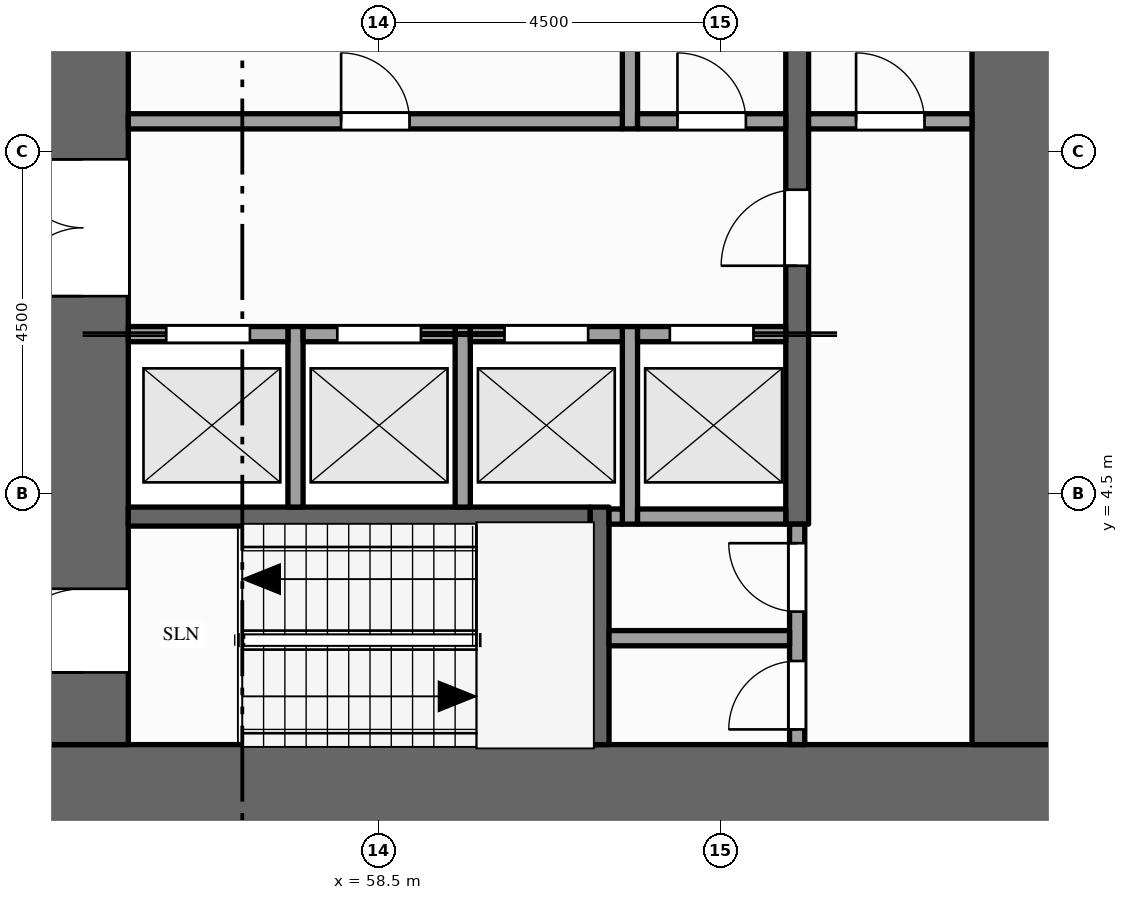
"""IFC4 building model, lengths in metres.
Left out: names, types, materials, properties, quantities, classifications, styles, units other than length and angle.
Written with IfcOpenShell. Run it as: python <this file> out.ifc"""

import sys

from ifc_helpers import new_model, si_unit, direction, frame, frame_2d, origin, place, context, subcontext, project, spatial, rectangle, extrude, element, fill, save


model = new_model("IFC4")
c1 = context("Model", 3, precision=1e-05, world=origin(), true_north=direction((0.0, 1.0)))
c2 = subcontext(c1, "Body", "Model", "MODEL_VIEW")
j1 = project(units=[si_unit("LENGTHUNIT", "METRE"), si_unit("PLANEANGLEUNIT", "RADIAN")], contexts=[c1])
p1 = place(None, origin())
s1 = spatial("IfcSite", under=j1, at=p1, CompositionType="ELEMENT")
p2 = place(p1, origin())
s2 = spatial("IfcBuilding", under=s1, at=p2, CompositionType="ELEMENT")
p3 = place(p2, frame((0.0, 0.0, 119.0)))
s3 = spatial("IfcBuildingStorey", under=s2, at=p3, CompositionType="ELEMENT", Elevation=119.0)
p4 = place(p3, frame((67.5, 0.6, -0.15), z_axis=(0.0, 0.0, 1.0), x_axis=(-1.0, 0.0, 0.0)))
e1 = element("IfcWall", 1, at=p4, inside=s3, PredefinedType="SHEAR", context=c2, shape_type="SweptSolid", body=[
    extrude(rectangle(XDim=13.5, YDim=1.2, at=frame_2d((6.75, 0.0))), origin(), (0.0, 0.0, 1.0), 4.0),
])
p5 = place(p3, frame((54.6, 1.2, -0.15), z_axis=(0.0, 0.0, 1.0), x_axis=(0.0, 1.0, 0.0)))
e2 = element("IfcWall", 2, at=p5, inside=s3, PredefinedType="SHEAR", context=c2, shape_type="SweptSolid", body=[
    extrude(rectangle(XDim=20.1, YDim=1.2, at=frame_2d((10.05, 0.0))), origin(), (0.0, 0.0, 1.0), 4.0),
])
p6 = place(p5, frame((5.9, 0.0, 0.15)))
e3 = element("IfcOpeningElement", 3, at=p6, cuts=e2, PredefinedType="OPENING", context=c2, shape_type="SweptSolid", body=[
    extrude(rectangle(XDim=1.8, YDim=2.1, at=frame_2d((0.9, 1.05))), frame((0.0, 0.61, 0.0), z_axis=(0.0, -1.0, 0.0), x_axis=(1.0, 0.0, 0.0)), (0.0, 0.0, 1.0), 1.22),
])
p7 = place(p5, frame((11.95, 0.0, 0.15)))
e4 = element("IfcOpeningElement", 4, at=p7, cuts=e2, PredefinedType="OPENING", context=c2, shape_type="SweptSolid", body=[
    extrude(rectangle(XDim=1.1, YDim=2.1, at=frame_2d((0.55, 1.05))), frame((0.0, 0.61, 0.0), z_axis=(0.0, -1.0, 0.0), x_axis=(1.0, 0.0, 0.0)), (0.0, 0.0, 1.0), 1.22),
])
p8 = place(p5, frame((0.95, 0.0, 0.15)))
e5 = element("IfcOpeningElement", 5, at=p8, cuts=e2, PredefinedType="OPENING", context=c2, shape_type="SweptSolid", body=[
    extrude(rectangle(XDim=1.1, YDim=2.1, at=frame_2d((0.55, 1.05))), frame((0.0, 0.61, 0.0), z_axis=(0.0, -1.0, 0.0), x_axis=(1.0, 0.0, 0.0)), (0.0, 0.0, 1.0), 1.22),
])
p9 = place(p5, frame((18.15, 0.0, 0.15)))
e6 = element("IfcOpeningElement", 6, at=p9, cuts=e2, PredefinedType="OPENING", context=c2, shape_type="SweptSolid", body=[
    extrude(rectangle(XDim=1.1, YDim=2.1, at=frame_2d((0.55, 1.05))), frame((0.0, 0.61, 0.0), z_axis=(0.0, -1.0, 0.0), x_axis=(1.0, 0.0, 0.0)), (0.0, 0.0, 1.0), 1.22),
])
p10 = place(p3, frame((66.9, 1.2, -0.15), z_axis=(0.0, 0.0, 1.0), x_axis=(0.0, 1.0, 0.0)))
e7 = element("IfcWall", 7, at=p10, inside=s3, PredefinedType="SHEAR", context=c2, shape_type="SweptSolid", body=[
    extrude(rectangle(XDim=20.1, YDim=1.2, at=frame_2d((10.05, 0.0))), origin(), (0.0, 0.0, 1.0), 4.0),
])
for number, where, z_axis, x_axis in (
    (8, (57.4, 4.325, 0.0), (0.0, 0.0, 1.0), (0.0, 1.0, 0.0)),
    (9, (59.6, 4.325, 0.0), (0.0, 0.0, 1.0), (0.0, 1.0, 0.0)),
):
    element("IfcWall", number, at=place(p3, frame(where, z_axis=z_axis, x_axis=x_axis)), inside=s3, PredefinedType="SOLIDWALL", context=c2, shape_type="SweptSolid", body=[
        extrude(rectangle(XDim=2.375, YDim=0.2, at=frame_2d((1.188, 0.0))), origin(), (0.0, 0.0, 1.0), 3.85),
    ])
p11 = place(p3, frame((61.4, 1.2, 0.0), z_axis=(0.0, 0.0, 1.0), x_axis=(0.0, 1.0, 0.0)))
e10 = element("IfcWall", 10, at=p11, inside=s3, PredefinedType="SHEAR", context=c2, shape_type="SweptSolid", body=[
    extrude(rectangle(XDim=3.125, YDim=0.25, at=frame_2d((1.562, 0.0))), origin(), (0.0, 0.0, 1.0), 3.85),
])
p12 = place(p3, frame((61.8, 4.1, 0.0), z_axis=(0.0, 0.0, 1.0), x_axis=(0.0, 1.0, 0.0)))
e11 = element("IfcWall", 11, at=p12, inside=s3, PredefinedType="SOLIDWALL", context=c2, shape_type="SweptSolid", body=[
    extrude(rectangle(XDim=2.6, YDim=0.2, at=frame_2d((1.3, 0.0))), origin(), (0.0, 0.0, 1.0), 3.85),
])
p13 = place(p3, frame((61.8, 9.3, 0.0), z_axis=(0.0, 0.0, 1.0), x_axis=(0.0, 1.0, 0.0)))
e12 = element("IfcWall", 12, at=p13, inside=s3, PredefinedType="PARTITIONING", context=c2, shape_type="SweptSolid", body=[
    extrude(rectangle(XDim=2.6, YDim=0.2, at=frame_2d((1.3, 0.0))), origin(), (0.0, 0.0, 1.0), 3.85),
])
p14 = place(p3, frame((64.0, 1.2, 0.0), z_axis=(0.0, 0.0, 1.0), x_axis=(0.0, 1.0, 0.0)))
e13 = element("IfcWall", 13, at=p14, inside=s3, PredefinedType="PARTITIONING", context=c2, shape_type="SweptSolid", body=[
    extrude(rectangle(XDim=2.9, YDim=0.2, at=frame_2d((1.45, 0.0))), origin(), (0.0, 0.0, 1.0), 3.85),
])
p15 = place(p14, frame((0.2, 0.0, 0.0)))
e14 = element("IfcOpeningElement", 14, at=p15, cuts=e13, PredefinedType="OPENING", context=c2, shape_type="SweptSolid", body=[
    extrude(rectangle(XDim=0.9, YDim=2.1, at=frame_2d((0.45, 1.05))), frame((0.0, 0.11, 0.0), z_axis=(0.0, -1.0, 0.0), x_axis=(1.0, 0.0, 0.0)), (0.0, 0.0, 1.0), 0.22),
])
p16 = place(p14, frame((1.75, 0.0, 0.0)))
e15 = element("IfcOpeningElement", 15, at=p16, cuts=e13, PredefinedType="OPENING", context=c2, shape_type="SweptSolid", body=[
    extrude(rectangle(XDim=0.9, YDim=2.1, at=frame_2d((0.45, 1.05))), frame((0.0, 0.11, 0.0), z_axis=(0.0, -1.0, 0.0), x_axis=(1.0, 0.0, 0.0)), (0.0, 0.0, 1.0), 0.22),
])
p17 = place(p3, frame((64.0, 4.1, 0.0), z_axis=(0.0, 0.0, 1.0), x_axis=(0.0, 1.0, 0.0)))
e16 = element("IfcWall", 16, at=p17, inside=s3, PredefinedType="SHEAR", context=c2, shape_type="SweptSolid", body=[
    extrude(rectangle(XDim=14.5, YDim=0.3, at=frame_2d((7.25, 0.0))), origin(), (0.0, 0.0, 1.0), 3.85),
])
p18 = place(p17, frame((3.4, 0.0, 0.0)))
e17 = element("IfcOpeningElement", 17, at=p18, cuts=e16, PredefinedType="OPENING", context=c2, shape_type="SweptSolid", body=[
    extrude(rectangle(XDim=1.0, YDim=2.1, at=frame_2d((0.5, 1.05))), frame((0.0, 0.16, 0.0), z_axis=(0.0, -1.0, 0.0), x_axis=(1.0, 0.0, 0.0)), (0.0, 0.0, 1.0), 0.32),
])
p19 = place(p17, frame((9.1, 0.0, 0.0)))
e18 = element("IfcOpeningElement", 18, at=p19, cuts=e16, PredefinedType="OPENING", context=c2, shape_type="SweptSolid", body=[
    extrude(rectangle(XDim=1.0, YDim=2.1, at=frame_2d((0.5, 1.05))), frame((0.0, 0.16, 0.0), z_axis=(0.0, -1.0, 0.0), x_axis=(1.0, 0.0, 0.0)), (0.0, 0.0, 1.0), 0.32),
])
p20 = place(p3, frame((61.525, 2.6, 0.0), z_axis=(0.0, 0.0, 1.0), x_axis=(1.0, 0.0, 0.0)))
e19 = element("IfcWall", 19, at=p20, inside=s3, PredefinedType="PARTITIONING", context=c2, shape_type="SweptSolid", body=[
    extrude(rectangle(XDim=2.375, YDim=0.2, at=frame_2d((1.188, 0.0))), origin(), (0.0, 0.0, 1.0), 3.85),
])
p21 = place(p3, frame((55.2, 4.2, 0.0), z_axis=(0.0, 0.0, 1.0), x_axis=(1.0, 0.0, 0.0)))
e20 = element("IfcWall", 20, at=p21, inside=s3, PredefinedType="SHEAR", context=c2, shape_type="SweptSolid", body=[
    extrude(rectangle(XDim=6.075, YDim=0.25, at=frame_2d((3.038, 0.0))), origin(), (0.0, 0.0, 1.0), 3.85),
])
p22 = place(p3, frame((61.525, 4.2, 0.0), z_axis=(0.0, 0.0, 1.0), x_axis=(1.0, 0.0, 0.0)))
e21 = element("IfcWall", 21, at=p22, inside=s3, PredefinedType="SOLIDWALL", context=c2, shape_type="SweptSolid", body=[
    extrude(rectangle(XDim=0.175, YDim=0.2, at=frame_2d((0.087, 0.0))), origin(), (0.0, 0.0, 1.0), 3.85),
])
p23 = place(p3, frame((61.9, 4.2, 0.0), z_axis=(0.0, 0.0, 1.0), x_axis=(1.0, 0.0, 0.0)))
e22 = element("IfcWall", 22, at=p23, inside=s3, PredefinedType="SOLIDWALL", context=c2, shape_type="SweptSolid", body=[
    extrude(rectangle(XDim=1.95, YDim=0.2, at=frame_2d((0.975, 0.0))), origin(), (0.0, 0.0, 1.0), 3.85),
])
p24 = place(p3, frame((55.2, 6.6, 0.0), z_axis=(0.0, 0.0, 1.0), x_axis=(1.0, 0.0, 0.0)))
e23 = element("IfcWall", 23, at=p24, inside=s3, PredefinedType="SOLIDWALL", context=c2, shape_type="SweptSolid", body=[
    extrude(rectangle(XDim=2.1, YDim=0.2, at=frame_2d((1.05, 0.0))), origin(), (0.0, 0.0, 1.0), 3.85),
])
p25 = place(p24, frame((0.5, 0.0, 0.012)))
e24 = element("IfcOpeningElement", 24, at=p25, cuts=e23, PredefinedType="OPENING", context=c2, shape_type="SweptSolid", body=[
    extrude(rectangle(XDim=1.1, YDim=2.1, at=frame_2d((0.55, 1.05))), frame((0.0, 0.11, 0.0), z_axis=(0.0, -1.0, 0.0), x_axis=(1.0, 0.0, 0.0)), (0.0, 0.0, 1.0), 0.22),
])
p26 = place(p3, frame((57.5, 6.6, 0.0), z_axis=(0.0, 0.0, 1.0), x_axis=(1.0, 0.0, 0.0)))
e25 = element("IfcWall", 25, at=p26, inside=s3, PredefinedType="SOLIDWALL", context=c2, shape_type="SweptSolid", body=[
    extrude(rectangle(XDim=2.0, YDim=0.2, at=frame_2d((1.0, 0.0))), origin(), (0.0, 0.0, 1.0), 3.85),
])
p27 = place(p26, frame((0.45, 0.0, 0.012)))
e26 = element("IfcOpeningElement", 26, at=p27, cuts=e25, PredefinedType="OPENING", context=c2, shape_type="SweptSolid", body=[
    extrude(rectangle(XDim=1.1, YDim=2.1, at=frame_2d((0.55, 1.05))), frame((0.0, 0.11, 0.0), z_axis=(0.0, -1.0, 0.0), x_axis=(1.0, 0.0, 0.0)), (0.0, 0.0, 1.0), 0.22),
])
p28 = place(p3, frame((59.7, 6.6, 0.0), z_axis=(0.0, 0.0, 1.0), x_axis=(1.0, 0.0, 0.0)))
e27 = element("IfcWall", 27, at=p28, inside=s3, PredefinedType="SOLIDWALL", context=c2, shape_type="SweptSolid", body=[
    extrude(rectangle(XDim=2.0, YDim=0.2, at=frame_2d((1.0, 0.0))), origin(), (0.0, 0.0, 1.0), 3.85),
])
p29 = place(p28, frame((0.45, 0.0, 0.012)))
e28 = element("IfcOpeningElement", 28, at=p29, cuts=e27, PredefinedType="OPENING", context=c2, shape_type="SweptSolid", body=[
    extrude(rectangle(XDim=1.1, YDim=2.1, at=frame_2d((0.55, 1.05))), frame((0.0, 0.11, 0.0), z_axis=(0.0, -1.0, 0.0), x_axis=(1.0, 0.0, 0.0)), (0.0, 0.0, 1.0), 0.22),
])
p30 = place(p3, frame((61.9, 6.6, 0.0), z_axis=(0.0, 0.0, 1.0), x_axis=(1.0, 0.0, 0.0)))
e29 = element("IfcWall", 29, at=p30, inside=s3, PredefinedType="SOLIDWALL", context=c2, shape_type="SweptSolid", body=[
    extrude(rectangle(XDim=1.95, YDim=0.2, at=frame_2d((0.975, 0.0))), origin(), (0.0, 0.0, 1.0), 3.85),
])
p31 = place(p30, frame((0.425, 0.0, 0.012)))
e30 = element("IfcOpeningElement", 30, at=p31, cuts=e29, PredefinedType="OPENING", context=c2, shape_type="SweptSolid", body=[
    extrude(rectangle(XDim=1.1, YDim=2.1, at=frame_2d((0.55, 1.05))), frame((0.0, 0.11, 0.0), z_axis=(0.0, -1.0, 0.0), x_axis=(1.0, 0.0, 0.0)), (0.0, 0.0, 1.0), 0.22),
])
p32 = place(p3, frame((55.2, 9.4, 0.0), z_axis=(0.0, 0.0, 1.0), x_axis=(1.0, 0.0, 0.0)))
e31 = element("IfcWall", 31, at=p32, inside=s3, PredefinedType="PARTITIONING", context=c2, shape_type="SweptSolid", body=[
    extrude(rectangle(XDim=6.5, YDim=0.2, at=frame_2d((3.25, 0.0))), origin(), (0.0, 0.0, 1.0), 3.85),
])
p33 = place(p32, frame((2.8, 0.0, 0.0)))
e32 = element("IfcOpeningElement", 32, at=p33, cuts=e31, PredefinedType="OPENING", context=c2, shape_type="SweptSolid", body=[
    extrude(rectangle(XDim=0.9, YDim=2.1, at=frame_2d((0.45, 1.05))), frame((0.0, 0.11, 0.0), z_axis=(0.0, -1.0, 0.0), x_axis=(1.0, 0.0, 0.0)), (0.0, 0.0, 1.0), 0.22),
])
p34 = place(p3, frame((61.9, 9.4, 0.0), z_axis=(0.0, 0.0, 1.0), x_axis=(1.0, 0.0, 0.0)))
e33 = element("IfcWall", 33, at=p34, inside=s3, PredefinedType="PARTITIONING", context=c2, shape_type="SweptSolid", body=[
    extrude(rectangle(XDim=1.95, YDim=0.2, at=frame_2d((0.975, 0.0))), origin(), (0.0, 0.0, 1.0), 3.85),
])
p35 = place(p34, frame((0.525, 0.0, 0.0)))
e34 = element("IfcOpeningElement", 34, at=p35, cuts=e33, PredefinedType="OPENING", context=c2, shape_type="SweptSolid", body=[
    extrude(rectangle(XDim=0.9, YDim=2.1, at=frame_2d((0.45, 1.05))), frame((0.0, 0.11, 0.0), z_axis=(0.0, -1.0, 0.0), x_axis=(1.0, 0.0, 0.0)), (0.0, 0.0, 1.0), 0.22),
])
p36 = place(p3, frame((64.15, 9.4, 0.0), z_axis=(0.0, 0.0, 1.0), x_axis=(1.0, 0.0, 0.0)))
e35 = element("IfcWall", 35, at=p36, inside=s3, PredefinedType="PARTITIONING", context=c2, shape_type="SweptSolid", body=[
    extrude(rectangle(XDim=2.15, YDim=0.2, at=frame_2d((1.075, 0.0))), origin(), (0.0, 0.0, 1.0), 3.85),
])
p37 = place(p36, frame((0.625, 0.0, 0.0)))
e36 = element("IfcOpeningElement", 36, at=p37, cuts=e35, PredefinedType="OPENING", context=c2, shape_type="SweptSolid", body=[
    extrude(rectangle(XDim=0.9, YDim=2.1, at=frame_2d((0.45, 1.05))), frame((0.0, 0.11, 0.0), z_axis=(0.0, -1.0, 0.0), x_axis=(1.0, 0.0, 0.0)), (0.0, 0.0, 1.0), 0.22),
])
p38 = place(p25, origin())
e37 = element("IfcDoor", 37, at=p38, inside=s3, OperationType="SLIDING_TO_LEFT", PredefinedType="DOOR", context=c2, shape_type="SweptSolid", body=[
    extrude(rectangle(XDim=1.1, YDim=2.1, at=frame_2d((0.55, 1.05))), frame((0.0, 0.025, 0.0), z_axis=(0.0, -1.0, 0.0), x_axis=(1.0, 0.0, 0.0)), (0.0, 0.0, 1.0), 0.05),
])
fill(e24, e37)
p39 = place(p27, origin())
e38 = element("IfcDoor", 38, at=p39, inside=s3, OperationType="SLIDING_TO_RIGHT", PredefinedType="DOOR", context=c2, shape_type="SweptSolid", body=[
    extrude(rectangle(XDim=1.1, YDim=2.1, at=frame_2d((0.55, 1.05))), frame((0.0, 0.025, 0.0), z_axis=(0.0, -1.0, 0.0), x_axis=(1.0, 0.0, 0.0)), (0.0, 0.0, 1.0), 0.05),
])
fill(e26, e38)
p40 = place(p29, origin())
e39 = element("IfcDoor", 39, at=p40, inside=s3, OperationType="SLIDING_TO_LEFT", PredefinedType="DOOR", context=c2, shape_type="SweptSolid", body=[
    extrude(rectangle(XDim=1.1, YDim=2.1, at=frame_2d((0.55, 1.05))), frame((0.0, 0.025, 0.0), z_axis=(0.0, -1.0, 0.0), x_axis=(1.0, 0.0, 0.0)), (0.0, 0.0, 1.0), 0.05),
])
fill(e28, e39)
p41 = place(p31, origin())
e40 = element("IfcDoor", 40, at=p41, inside=s3, OperationType="SLIDING_TO_RIGHT", PredefinedType="DOOR", context=c2, shape_type="SweptSolid", body=[
    extrude(rectangle(XDim=1.1, YDim=2.1, at=frame_2d((0.55, 1.05))), frame((0.0, 0.025, 0.0), z_axis=(0.0, -1.0, 0.0), x_axis=(1.0, 0.0, 0.0)), (0.0, 0.0, 1.0), 0.05),
])
fill(e30, e40)
p42 = place(p6, origin())
e41 = element("IfcDoor", 41, at=p42, inside=s3, OperationType="DOUBLE_DOOR_SINGLE_SWING", PredefinedType="DOOR", context=c2, shape_type="SweptSolid", body=[
    extrude(rectangle(XDim=1.8, YDim=2.1, at=frame_2d((0.9, 1.05))), frame((0.0, 0.025, 0.0), z_axis=(0.0, -1.0, 0.0), x_axis=(1.0, 0.0, 0.0)), (0.0, 0.0, 1.0), 0.05),
])
fill(e3, e41)
p43 = place(p18, origin())
e42 = element("IfcDoor", 42, at=p43, inside=s3, OperationType="SINGLE_SWING_LEFT", PredefinedType="DOOR", context=c2, shape_type="SweptSolid", body=[
    extrude(rectangle(XDim=1.0, YDim=2.1, at=frame_2d((0.5, 1.05))), frame((0.0, 0.025, 0.0), z_axis=(0.0, -1.0, 0.0), x_axis=(1.0, 0.0, 0.0)), (0.0, 0.0, 1.0), 0.05),
])
fill(e17, e42)
p44 = place(p37, origin())
e43 = element("IfcDoor", 43, at=p44, inside=s3, OperationType="SINGLE_SWING_LEFT", PredefinedType="DOOR", context=c2, shape_type="SweptSolid", body=[
    extrude(rectangle(XDim=0.9, YDim=2.1, at=frame_2d((0.45, 1.05))), frame((0.0, 0.025, 0.0), z_axis=(0.0, -1.0, 0.0), x_axis=(1.0, 0.0, 0.0)), (0.0, 0.0, 1.0), 0.05),
])
fill(e36, e43)
p45 = place(p8, origin())
e44 = element("IfcDoor", 44, at=p45, inside=s3, OperationType="SINGLE_SWING_LEFT", PredefinedType="DOOR", context=c2, shape_type="SweptSolid", body=[
    extrude(rectangle(XDim=1.1, YDim=2.1, at=frame_2d((0.55, 1.05))), frame((0.0, 0.025, 0.0), z_axis=(0.0, -1.0, 0.0), x_axis=(1.0, 0.0, 0.0)), (0.0, 0.0, 1.0), 0.05),
])
fill(e5, e44)
p46 = place(p15, origin())
e45 = element("IfcDoor", 45, at=p46, inside=s3, OperationType="SINGLE_SWING_LEFT", PredefinedType="DOOR", context=c2, shape_type="SweptSolid", body=[
    extrude(rectangle(XDim=0.9, YDim=2.1, at=frame_2d((0.45, 1.05))), frame((0.0, 0.025, 0.0), z_axis=(0.0, -1.0, 0.0), x_axis=(1.0, 0.0, 0.0)), (0.0, 0.0, 1.0), 0.05),
])
fill(e14, e45)
p47 = place(p16, origin())
e46 = element("IfcDoor", 46, at=p47, inside=s3, OperationType="SINGLE_SWING_RIGHT", PredefinedType="DOOR", context=c2, shape_type="SweptSolid", body=[
    extrude(rectangle(XDim=0.9, YDim=2.1, at=frame_2d((0.45, 1.05))), frame((0.0, 0.025, 0.0), z_axis=(0.0, -1.0, 0.0), x_axis=(1.0, 0.0, 0.0)), (0.0, 0.0, 1.0), 0.05),
])
fill(e15, e46)
p48 = place(p33, origin())
e47 = element("IfcDoor", 47, at=p48, inside=s3, OperationType="SINGLE_SWING_LEFT", PredefinedType="DOOR", context=c2, shape_type="SweptSolid", body=[
    extrude(rectangle(XDim=0.9, YDim=2.1, at=frame_2d((0.45, 1.05))), frame((0.0, 0.025, 0.0), z_axis=(0.0, -1.0, 0.0), x_axis=(1.0, 0.0, 0.0)), (0.0, 0.0, 1.0), 0.05),
])
fill(e32, e47)
p49 = place(p35, origin())
e48 = element("IfcDoor", 48, at=p49, inside=s3, OperationType="SINGLE_SWING_LEFT", PredefinedType="DOOR", context=c2, shape_type="SweptSolid", body=[
    extrude(rectangle(XDim=0.9, YDim=2.1, at=frame_2d((0.45, 1.05))), frame((0.0, 0.025, 0.0), z_axis=(0.0, -1.0, 0.0), x_axis=(1.0, 0.0, 0.0)), (0.0, 0.0, 1.0), 0.05),
])
fill(e34, e48)
save(model, sys.argv[1])
